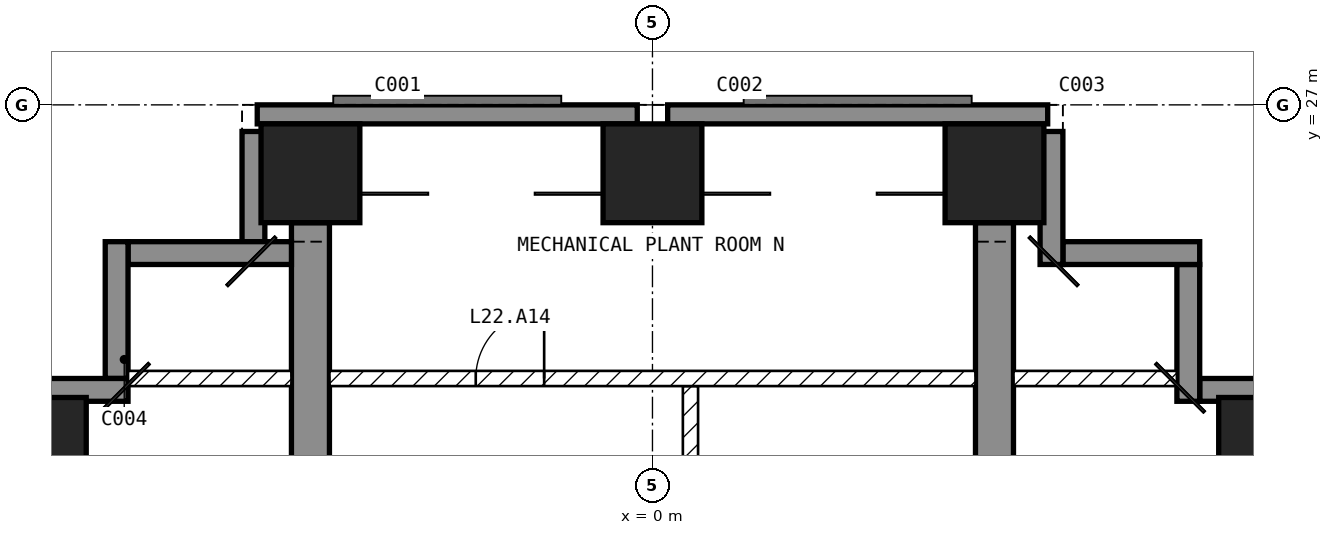
"""IFC4 building model, lengths in metres.
Left out: names, types, materials, properties, quantities, classifications, styles, units other than length and angle.
Written with IfcOpenShell. Run it as: python <this file> out.ifc"""

import sys

from ifc_helpers import new_model, si_unit, direction, frame, frame_2d, origin, origin_2d, place, context, subcontext, project, spatial, polyline, rectangle, outline, extrude, element, fill, save


model = new_model("IFC4")
c1 = context("Model", 3, precision=1e-05, world=origin(), true_north=direction((0.0, 1.0)))
c2 = subcontext(c1, "Body", "Model", "MODEL_VIEW")
j1 = project(units=[si_unit("LENGTHUNIT", "METRE"), si_unit("PLANEANGLEUNIT", "RADIAN")], contexts=[c1])
p1 = place(None, origin())
s1 = spatial("IfcSite", under=j1, at=p1, CompositionType="ELEMENT")
p2 = place(p1, origin())
s2 = spatial("IfcBuilding", under=s1, at=p2, CompositionType="ELEMENT")
p3 = place(p2, frame((0.0, 0.0, 97.9)))
s3 = spatial("IfcBuildingStorey", under=s2, at=p3, CompositionType="ELEMENT", Elevation=97.9)
for number, where, z_axis, x_axis in (
    (1, (-8.1, 22.5, -0.45), (0.0, 0.0, 1.0), (1.0, 0.0, 0.0)),
    (2, (-4.5, 26.1, -0.45), (0.0, 0.0, 1.0), (1.0, 0.0, 0.0)),
    (3, (0.0, 26.1, -0.45), (0.0, 0.0, 1.0), (1.0, 0.0, 0.0)),
    (4, (4.5, 26.1, -0.45), (0.0, 0.0, 1.0), (1.0, 0.0, 0.0)),
    (5, (8.1, 22.5, -0.45), (0.0, 0.0, 1.0), (1.0, 0.0, 0.0)),
):
    element("IfcColumn", number, at=place(p3, frame(where, z_axis=z_axis, x_axis=x_axis)), inside=s3, PredefinedType="COLUMN", context=c2, shape_type="SweptSolid", body=[
        extrude(rectangle(XDim=1.3, YDim=1.3, at=origin_2d()), origin(), (0.0, 0.0, 1.0), 4.7),
    ])
for number, where, z_axis, x_axis in (
    (6, (-4.75, 9.0, -0.45), (1.0, 0.0, 0.0), (0.0, 1.0, 0.0)),
    (7, (4.25, 9.0, -0.45), (1.0, 0.0, 0.0), (0.0, 1.0, 0.0)),
):
    element("IfcWall", number, at=place(p3, frame(where, z_axis=z_axis, x_axis=x_axis)), inside=s3, PredefinedType="SHEAR", context=c2, shape_type="SweptSolid", body=[
        extrude(outline(polyline([(0.0, 0.0), (2.1, 0.0), (2.1, 2.85), (4.5, 2.85), (4.5, 0.0), (9.9, 0.0), (9.9, 2.85), (12.3, 2.85), (12.3, 0.0), (16.45, 0.0), (16.45, 4.7), (0.0, 4.7), (0.0, 0.0)])), origin(), (0.0, 0.0, 1.0), 0.5),
    ])
for number, where, z_axis, x_axis in (
    (8, (5.2, 26.875, 0.0), (0.0, 0.0, 1.0), (-1.0, 0.0, 0.0)),
    (9, (-0.2, 26.875, 0.0), (0.0, 0.0, 1.0), (-1.0, 0.0, 0.0)),
):
    element("IfcWall", number, at=place(p3, frame(where, z_axis=z_axis, x_axis=x_axis)), inside=s3, PredefinedType="SOLIDWALL", context=c2, shape_type="SweptSolid", body=[
        extrude(rectangle(XDim=5.0, YDim=0.25, at=frame_2d((2.5, 0.0))), origin(), (0.0, 0.0, 1.0), 4.25),
    ])
p4 = place(p3, frame((8.65, 23.25, 0.0), z_axis=(0.0, 0.0, 1.0), x_axis=(-1.0, 0.0, 0.0)))
e10 = element("IfcWall", 10, at=p4, inside=s3, PredefinedType="SOLIDWALL", context=c2, shape_type="SweptSolid", body=[
    extrude(rectangle(XDim=1.45, YDim=0.3, at=frame_2d((0.725, 0.0))), origin(), (0.0, 0.0, 1.0), 4.25),
])
p5 = place(p3, frame((7.05, 23.1, 0.0), z_axis=(0.0, 0.0, 1.0), x_axis=(0.0, 1.0, 0.0)))
e11 = element("IfcWall", 11, at=p5, inside=s3, PredefinedType="SOLIDWALL", context=c2, shape_type="SweptSolid", body=[
    extrude(rectangle(XDim=1.8, YDim=0.3, at=frame_2d((0.9, 0.0))), origin(), (0.0, 0.0, 1.0), 4.25),
])
p6 = place(p3, frame((7.2, 25.05, 0.0), z_axis=(0.0, 0.0, 1.0), x_axis=(-1.0, 0.0, 0.0)))
e12 = element("IfcWall", 12, at=p6, inside=s3, PredefinedType="SOLIDWALL", context=c2, shape_type="SweptSolid", body=[
    extrude(rectangle(XDim=1.8, YDim=0.3, at=frame_2d((0.9, 0.0))), origin(), (0.0, 0.0, 1.0), 4.25),
])
p7 = place(p3, frame((5.25, 24.9, 0.0), z_axis=(0.0, 0.0, 1.0), x_axis=(0.0, 1.0, 0.0)))
e13 = element("IfcWall", 13, at=p7, inside=s3, PredefinedType="SOLIDWALL", context=c2, shape_type="SweptSolid", body=[
    extrude(rectangle(XDim=1.75, YDim=0.3, at=frame_2d((0.875, 0.0))), origin(), (0.0, 0.0, 1.0), 4.25),
])
p8 = place(p3, frame((-5.25, 26.65, 0.0), z_axis=(0.0, 0.0, 1.0), x_axis=(0.0, -1.0, 0.0)))
e14 = element("IfcWall", 14, at=p8, inside=s3, PredefinedType="SOLIDWALL", context=c2, shape_type="SweptSolid", body=[
    extrude(rectangle(XDim=1.45, YDim=0.3, at=frame_2d((0.725, 0.0))), origin(), (0.0, 0.0, 1.0), 4.25),
])
p9 = place(p3, frame((-4.75, 25.05, 0.0), z_axis=(0.0, 0.0, 1.0), x_axis=(-1.0, 0.0, 0.0)))
e15 = element("IfcWall", 15, at=p9, inside=s3, PredefinedType="SOLIDWALL", context=c2, shape_type="SweptSolid", body=[
    extrude(rectangle(XDim=2.15, YDim=0.3, at=frame_2d((1.075, 0.0))), origin(), (0.0, 0.0, 1.0), 4.25),
])
p10 = place(p3, frame((-7.05, 25.2, 0.0), z_axis=(0.0, 0.0, 1.0), x_axis=(0.0, -1.0, 0.0)))
e16 = element("IfcWall", 16, at=p10, inside=s3, PredefinedType="SOLIDWALL", context=c2, shape_type="SweptSolid", body=[
    extrude(rectangle(XDim=1.8, YDim=0.3, at=frame_2d((0.9, 0.0))), origin(), (0.0, 0.0, 1.0), 4.25),
])
p11 = place(p3, frame((-6.9, 23.25, 0.0), z_axis=(0.0, 0.0, 1.0), x_axis=(-1.0, 0.0, 0.0)))
e17 = element("IfcWall", 17, at=p11, inside=s3, PredefinedType="SOLIDWALL", context=c2, shape_type="SweptSolid", body=[
    extrude(rectangle(XDim=1.75, YDim=0.3, at=frame_2d((0.875, 0.0))), origin(), (0.0, 0.0, 1.0), 4.25),
])
p12 = place(p3, frame((0.5, 23.3, 0.0), z_axis=(0.0, 0.0, 1.0), x_axis=(0.0, -1.0, 0.0)))
e18 = element("IfcWall", 18, at=p12, inside=s3, PredefinedType="PARTITIONING", context=c2, shape_type="SweptSolid", body=[
    extrude(rectangle(XDim=4.3, YDim=0.2, at=frame_2d((2.15, 0.0))), origin(), (0.0, 0.0, 1.0), 4.25),
])
p13 = place(p12, frame((1.7, 0.0, 0.0)))
e19 = element("IfcOpeningElement", 19, at=p13, cuts=e18, PredefinedType="OPENING", context=c2, shape_type="SweptSolid", body=[
    extrude(rectangle(XDim=0.9, YDim=2.1, at=frame_2d((0.45, 1.05))), frame((0.0, 0.11, 0.0), z_axis=(0.0, -1.0, 0.0), x_axis=(1.0, 0.0, 0.0)), (0.0, 0.0, 1.0), 0.22),
])
p14 = place(p3, frame((-4.25, 23.4, 0.0), z_axis=(0.0, 0.0, 1.0), x_axis=(1.0, 0.0, 0.0)))
e20 = element("IfcWall", 20, at=p14, inside=s3, PredefinedType="PARTITIONING", context=c2, shape_type="SweptSolid", body=[
    extrude(rectangle(XDim=8.5, YDim=0.2, at=frame_2d((4.25, 0.0))), origin(), (0.0, 0.0, 1.0), 4.25),
])
p15 = place(p14, frame((1.925, 0.0, 0.0)))
e21 = element("IfcOpeningElement", 21, at=p15, cuts=e20, PredefinedType="OPENING", context=c2, shape_type="SweptSolid", body=[
    extrude(rectangle(XDim=0.9, YDim=2.1, at=frame_2d((0.45, 1.05))), frame((0.0, 0.11, 0.0), z_axis=(0.0, -1.0, 0.0), x_axis=(1.0, 0.0, 0.0)), (0.0, 0.0, 1.0), 0.22),
])
for number, where, z_axis, x_axis in (
    (22, (4.75, 23.4, 0.0), (0.0, 0.0, 1.0), (1.0, 0.0, 0.0)),
    (23, (-6.9, 23.4, 0.0), (0.0, 0.0, 1.0), (1.0, 0.0, 0.0)),
):
    element("IfcWall", number, at=place(p3, frame(where, z_axis=z_axis, x_axis=x_axis)), inside=s3, PredefinedType="PARTITIONING", context=c2, shape_type="SweptSolid", body=[
        extrude(rectangle(XDim=2.15, YDim=0.2, at=frame_2d((1.075, 0.0))), origin(), (0.0, 0.0, 1.0), 4.25),
    ])
p16 = place(p15, origin())
e24 = element("IfcDoor", 24, at=p16, inside=s3, OperationType="SINGLE_SWING_RIGHT", PredefinedType="DOOR", context=c2, shape_type="SweptSolid", body=[
    extrude(rectangle(XDim=0.9, YDim=2.1, at=frame_2d((0.45, 1.05))), frame((0.0, 0.025, 0.0), z_axis=(0.0, -1.0, 0.0), x_axis=(1.0, 0.0, 0.0)), (0.0, 0.0, 1.0), 0.05),
])
fill(e21, e24)
save(model, sys.argv[1])
